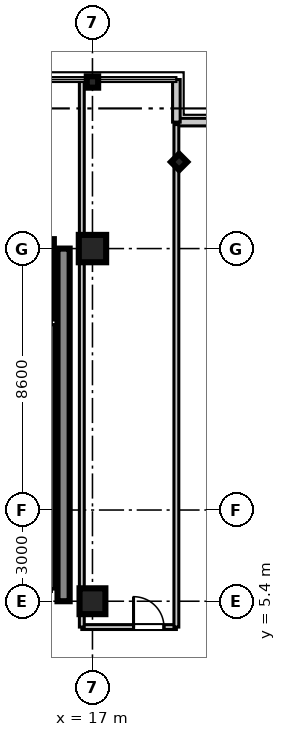
"""IFC4 building model, lengths in metres.
Left out: names, types, materials, properties, quantities, classifications, styles, units other than length and angle.
Written with IfcOpenShell. Run it as: python <this file> out.ifc"""

import sys

from ifc_helpers import new_model, si_unit, direction, frame, frame_2d, origin, origin_2d, place, context, subcontext, project, spatial, rectangle, i_section, extrude, source, transform, mapped, element, fill, save


model = new_model("IFC4")
c1 = context("Model", 3, precision=1e-05, world=origin(), true_north=direction((0.0, 1.0)))
c2 = subcontext(c1, "Body", "Model", "MODEL_VIEW")
j1 = project(units=[si_unit("LENGTHUNIT", "METRE"), si_unit("PLANEANGLEUNIT", "RADIAN")], contexts=[c1])
p1 = place(None, origin())
s1 = spatial("IfcSite", under=j1, at=p1, CompositionType="ELEMENT")
p2 = place(p1, origin())
s2 = spatial("IfcBuilding", under=s1, at=p2, CompositionType="ELEMENT")
p3 = place(p2, frame((0.0, 0.0, 319.55)))
s3 = spatial("IfcBuildingStorey", under=s2, at=p3, CompositionType="ELEMENT", Elevation=319.55)
m1 = source(origin(), c2, "Body", "SweptSolid", [
    extrude(rectangle(XDim=0.85, YDim=0.85, at=origin_2d()), origin(), (0.0, 0.0, 1.0), 3.755),
])
p4 = place(p3, frame((17.0, 5.4, 0.0), z_axis=(0.0, 0.0, 1.0), x_axis=(1.0, 0.0, 0.0)))
e1 = element("IfcColumn", 1, at=p4, inside=s3, PredefinedType="PILASTER", context=c2, shape_type="MappedRepresentation", body=[
    mapped(m1, transform((0.0, 0.0, 0.0), scale=1.0)),
])
m2 = source(origin(), c2, "Body", "SweptSolid", [
    extrude(rectangle(XDim=0.9, YDim=0.9, at=origin_2d()), origin(), (0.0, 0.0, 1.0), 3.755),
])
p5 = place(p3, frame((17.0, 17.0, 0.0), z_axis=(0.0, 0.0, 1.0), x_axis=(1.0, 0.0, 0.0)))
e2 = element("IfcColumn", 2, at=p5, inside=s3, PredefinedType="COLUMN", context=c2, shape_type="MappedRepresentation", body=[
    mapped(m2, transform((0.0, 0.0, 0.0), scale=1.0)),
])
m3 = source(origin(), c2, "Body", "SweptSolid", [
    extrude(i_section(OverallWidth=0.374, OverallDepth=0.374, WebThickness=0.014, FlangeThickness=0.023, at=origin_2d()), origin(), (0.0, 0.0, 1.0), 3.755),
])
for number, where, z_axis, x_axis in (
    (3, (17.0, 22.48, 0.0), (0.0, 0.0, 1.0), (0.0, 1.0, 0.0)),
    (4, (19.85, 19.85, 0.0), (0.0, 0.0, 1.0), (0.707, 0.707, 0.0)),
):
    element("IfcColumn", number, at=place(p3, frame(where, z_axis=z_axis, x_axis=x_axis)), inside=s3, PredefinedType="COLUMN", context=c2, shape_type="MappedRepresentation", body=[
        mapped(m3, transform((0.0, 0.0, 0.0), scale=1.0)),
    ])
m4 = source(origin(), c2, "Body", "SweptSolid", [
    extrude(rectangle(XDim=11.6, YDim=0.4, at=frame_2d((5.8, 0.0))), origin(), (0.0, 0.0, 1.0), 3.5),
])
p6 = place(p3, frame((16.05, 5.4, 0.0), z_axis=(0.0, 0.0, 1.0), x_axis=(0.0, 1.0, 0.0)))
e5 = element("IfcWall", 5, at=p6, inside=s3, PredefinedType="SHEAR", context=c2, shape_type="MappedRepresentation", body=[
    mapped(m4, transform((0.0, 0.0, 0.0), scale=1.0)),
])
m5 = source(origin(), c2, "Body", "SweptSolid", [
    extrude(rectangle(XDim=2.61, YDim=0.22, at=frame_2d((1.305, 0.0))), origin(), (0.0, 0.0, 1.0), 3.5),
])
p7 = place(p3, frame((15.62, 14.7, 0.0), z_axis=(0.0, 0.0, 1.0), x_axis=(0.0, 1.0, 0.0)))
e6 = element("IfcWall", 6, at=p7, inside=s3, PredefinedType="SHEAR", context=c2, shape_type="MappedRepresentation", body=[
    mapped(m5, transform((0.0, 0.0, 0.0), scale=1.0)),
])
m6 = source(origin(), c2, "Body", "SweptSolid", [
    extrude(rectangle(XDim=1.4, YDim=0.25, at=frame_2d((0.7, 0.0))), origin(), (0.0, 0.0, 1.0), 3.5),
])
p8 = place(p3, frame((19.76, 21.16, 0.0), z_axis=(0.0, 0.0, 1.0), x_axis=(1.0, 0.0, 0.0)))
e7 = element("IfcWall", 7, at=p8, inside=s3, PredefinedType="STANDARD", context=c2, shape_type="MappedRepresentation", body=[
    mapped(m6, transform((0.0, 0.0, 0.0), scale=1.0)),
])
m7 = source(origin(), c2, "Body", "SweptSolid", [
    extrude(rectangle(XDim=1.4, YDim=0.25, at=frame_2d((0.7, 0.0))), origin(), (0.0, 0.0, 1.0), 3.5),
])
p9 = place(p3, frame((19.76, 21.16, 0.0), z_axis=(0.0, 0.0, 1.0), x_axis=(0.0, 1.0, 0.0)))
e8 = element("IfcWall", 8, at=p9, inside=s3, PredefinedType="STANDARD", context=c2, shape_type="MappedRepresentation", body=[
    mapped(m7, transform((0.0, 0.0, 0.0), scale=1.0)),
])
m8 = source(origin(), c2, "Body", "SweptSolid", [
    extrude(rectangle(XDim=8.7, YDim=0.16, at=frame_2d((4.35, 0.0))), origin(), (0.0, 0.0, 1.0), 2.84),
])
p10 = place(p3, frame((15.65, 5.8, 0.0), z_axis=(0.0, 0.0, 1.0), x_axis=(0.0, 1.0, 0.0)))
e9 = element("IfcWall", 9, at=p10, inside=s3, PredefinedType="PARTITIONING", context=c2, shape_type="MappedRepresentation", body=[
    mapped(m8, transform((0.0, 0.0, 0.0), scale=1.0)),
])
m9 = source(origin(), c2, "Body", "SweptSolid", [
    extrude(rectangle(XDim=3.11, YDim=0.16, at=frame_2d((1.555, 0.0))), origin(), (0.0, 0.0, 1.0), 2.84),
])
p11 = place(p3, frame((16.65, 4.55, 0.0), z_axis=(0.0, 0.0, 1.0), x_axis=(1.0, 0.0, 0.0)))
e10 = element("IfcWall", 10, at=p11, inside=s3, PredefinedType="PARTITIONING", context=c2, shape_type="MappedRepresentation", body=[
    mapped(m9, transform((0.0, 0.0, 0.0), scale=1.0)),
])
p12 = place(p11, frame((1.701, 0.0, 0.0)))
e11 = element("IfcOpeningElement", 11, at=p12, cuts=e10, PredefinedType="OPENING", context=c2, shape_type="SweptSolid", body=[
    extrude(rectangle(XDim=1.0, YDim=2.1, at=frame_2d((0.5, 1.05))), frame((0.0, 0.09, 0.0), z_axis=(0.0, -1.0, 0.0), x_axis=(1.0, 0.0, 0.0)), (0.0, 0.0, 1.0), 0.18),
])
m10 = source(origin(), c2, "Body", "SweptSolid", [
    extrude(rectangle(XDim=17.95, YDim=0.16, at=frame_2d((8.975, 0.0))), origin(), (0.0, 0.0, 1.0), 2.84),
])
p13 = place(p3, frame((16.65, 4.55, 0.0), z_axis=(0.0, 0.0, 1.0), x_axis=(0.0, 1.0, 0.0)))
e12 = element("IfcWall", 12, at=p13, inside=s3, PredefinedType="PARTITIONING", context=c2, shape_type="MappedRepresentation", body=[
    mapped(m10, transform((0.0, 0.0, 0.0), scale=1.0)),
])
m11 = source(origin(), c2, "Body", "SweptSolid", [
    extrude(rectangle(XDim=16.53, YDim=0.16, at=frame_2d((8.265, 0.0))), origin(), (0.0, 0.0, 1.0), 2.84),
])
p14 = place(p3, frame((19.76, 4.55, 0.0), z_axis=(0.0, 0.0, 1.0), x_axis=(0.0, 1.0, 0.0)))
e13 = element("IfcWall", 13, at=p14, inside=s3, PredefinedType="PARTITIONING", context=c2, shape_type="MappedRepresentation", body=[
    mapped(m11, transform((0.0, 0.0, 0.0), scale=1.0)),
])
m12 = source(origin(), c2, "Body", "SweptSolid", [
    extrude(rectangle(XDim=1.0, YDim=2.1, at=frame_2d((0.5, 1.05))), frame((0.0, 0.025, 0.0), z_axis=(0.0, -1.0, 0.0), x_axis=(1.0, 0.0, 0.0)), (0.0, 0.0, 1.0), 0.05),
])
p15 = place(p12, origin())
e14 = element("IfcDoor", 14, at=p15, inside=s3, OperationType="SINGLE_SWING_LEFT", PredefinedType="DOOR", context=c2, shape_type="MappedRepresentation", body=[
    mapped(m12, transform((0.0, 0.0, 0.0), scale=1.0)),
])
fill(e11, e14)
save(model, sys.argv[1])
